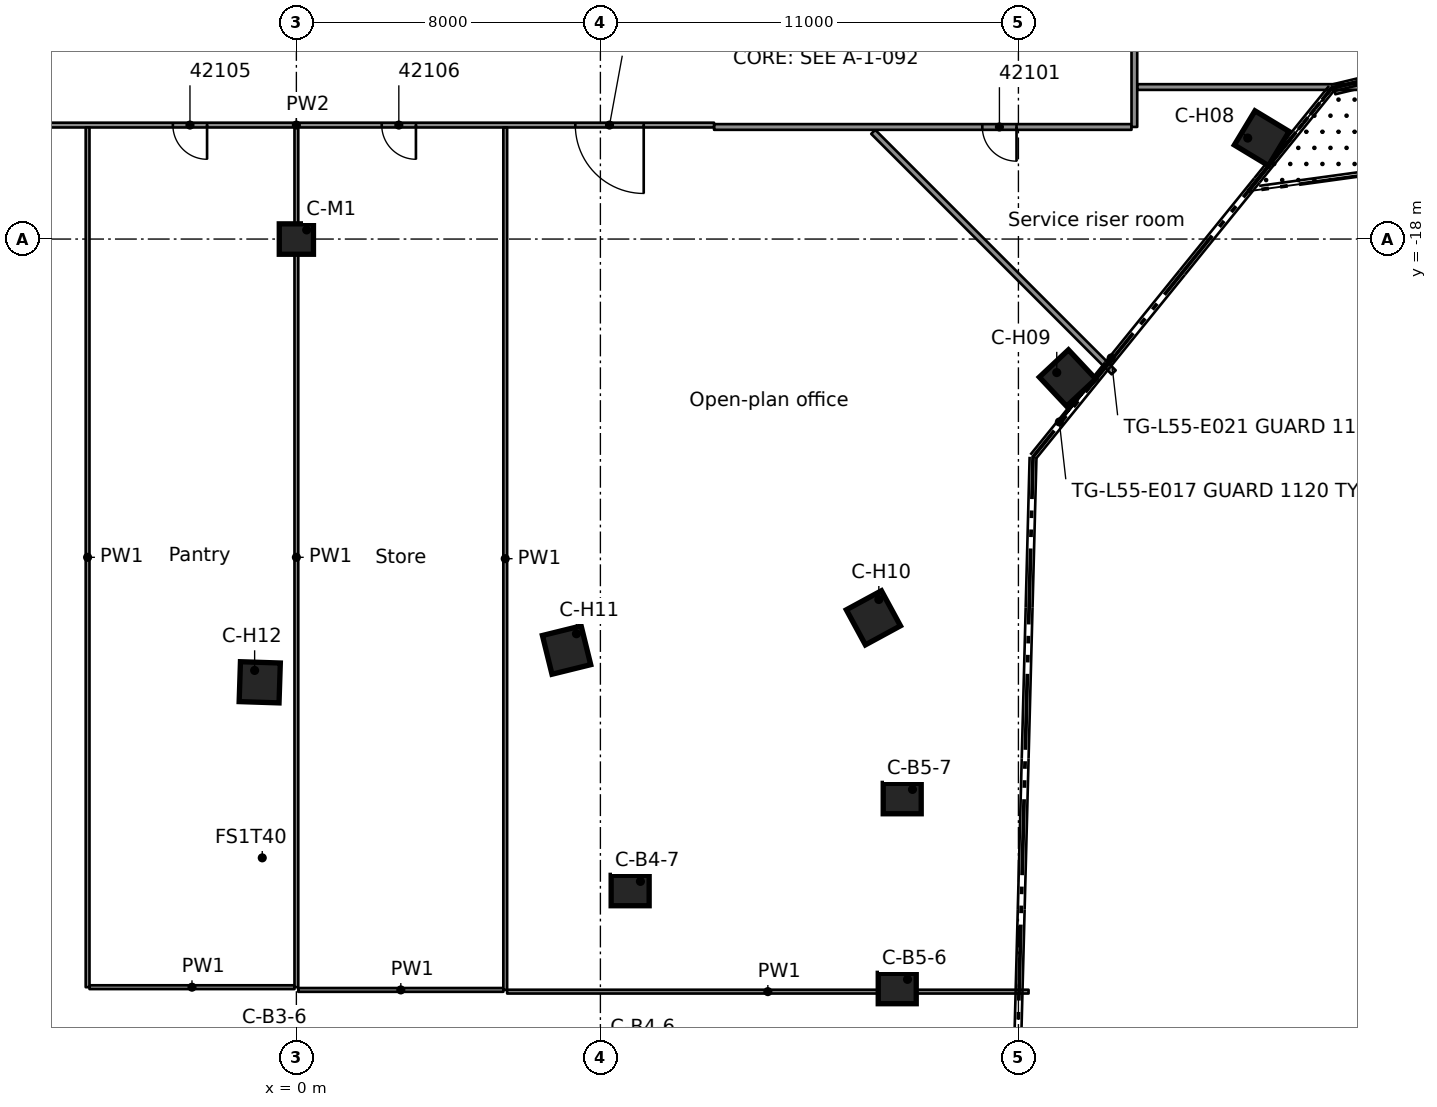
"""IFC4 building model, lengths in metres.
Left out: names, types, materials, properties, quantities, classifications, styles, units other than length and angle.
Written with IfcOpenShell. Run it as: python <this file> out.ifc"""

import sys

from ifc_helpers import new_model, si_unit, direction, frame, frame_2d, origin, origin_2d, place, context, subcontext, project, spatial, rectangle, extrude, element, fill, save


model = new_model("IFC4")
c1 = context("Model", 3, precision=1e-05, world=origin(), true_north=direction((0.0, 1.0)))
c2 = subcontext(c1, "Body", "Model", "MODEL_VIEW")
j1 = project(units=[si_unit("LENGTHUNIT", "METRE"), si_unit("PLANEANGLEUNIT", "RADIAN")], contexts=[c1])
p1 = place(None, origin())
s1 = spatial("IfcSite", under=j1, at=p1, CompositionType="ELEMENT")
p2 = place(p1, origin())
s2 = spatial("IfcBuilding", under=s1, at=p2, CompositionType="ELEMENT")
p3 = place(p2, frame((0.0, 0.0, 210.5)))
s3 = spatial("IfcBuildingStorey", under=s2, at=p3, CompositionType="ELEMENT", Elevation=210.5)
for number, where, z_axis, x_axis in (
    (1, (8.783, -35.142, 0.0), (0.0, 0.0, 1.0), (1.0, 0.0, 0.0)),
    (2, (15.811, -37.72, 0.0), (0.0, 0.0, 1.0), (1.0, 0.0, 0.0)),
    (3, (15.942, -32.722, 0.0), (0.0, 0.0, 1.0), (1.0, 0.0, 0.0)),
):
    element("IfcColumn", number, at=place(p3, frame(where, z_axis=z_axis, x_axis=x_axis)), inside=s3, PredefinedType="COLUMN", context=c2, shape_type="SweptSolid", body=[
        extrude(rectangle(XDim=1.0, YDim=0.8, at=origin_2d()), origin(), (0.0, 0.0, 1.0), 3.5),
    ])
for number, where, z_axis, x_axis in (
    (4, (25.403, -15.347, 0.0), (0.0, 0.0, 1.0), (0.856, -0.517, 0.0)),
    (5, (20.293, -21.657, 0.0), (0.0, 0.0, 1.0), (0.684, -0.73, 0.0)),
    (6, (15.184, -27.966, 0.0), (0.0, 0.0, 1.0), (0.477, -0.879, 0.0)),
    (7, (7.11, -28.815, 0.0), (0.0, 0.0, 1.0), (0.24, -0.971, 0.0)),
    (8, (-0.964, -29.663, 0.0), (0.0, 0.0, 1.0), (-0.032, -0.999, 0.0)),
):
    element("IfcColumn", number, at=place(p3, frame(where, z_axis=z_axis, x_axis=x_axis)), inside=s3, PredefinedType="COLUMN", context=c2, shape_type="SweptSolid", body=[
        extrude(rectangle(XDim=1.05, YDim=1.05, at=origin_2d()), origin(), (0.0, 0.0, 1.0), 3.5),
    ])
p4 = place(p3, frame((0.0, -18.0, 0.0), z_axis=(0.0, 0.0, 1.0), x_axis=(1.0, 0.0, 0.0)))
e9 = element("IfcColumn", 9, at=p4, inside=s3, PredefinedType="COLUMN", context=c2, shape_type="SweptSolid", body=[
    extrude(rectangle(XDim=0.9, YDim=0.8, at=origin_2d()), origin(), (0.0, 0.0, 1.0), 3.5),
])
p5 = place(p3, frame((33.862, -12.573, 0.0), z_axis=(0.0, 0.0, 1.0), x_axis=(-0.97236553207, -0.233463641798, 0.0)))
e10 = element("IfcWall", 10, at=p5, inside=s3, PredefinedType="STANDARD", context=c2, shape_type="SweptSolid", body=[
    extrude(rectangle(XDim=6.72, YDim=0.1, at=frame_2d((3.36, 0.0))), origin(), (0.0, 0.0, 1.0), 3.1),
])
p6 = place(p5, frame((2.46, 0.0, 0.0)))
e11 = element("IfcOpeningElement", 11, at=p6, cuts=e10, PredefinedType="OPENING", context=c2, shape_type="SweptSolid", body=[
    extrude(rectangle(XDim=1.8, YDim=2.4, at=frame_2d((0.9, 1.2))), frame((0.0, 0.06, 0.0), z_axis=(0.0, -1.0, 0.0), x_axis=(1.0, 0.0, 0.0)), (0.0, 0.0, 1.0), 0.12),
])
p7 = place(p5, frame((1.46, 0.0, 0.0)))
e12 = element("IfcOpeningElement", 12, at=p7, cuts=e10, PredefinedType="OPENING", context=c2, shape_type="SweptSolid", body=[
    extrude(rectangle(XDim=0.9, YDim=2.4, at=frame_2d((0.45, 1.2))), frame((0.0, 0.06, 0.0), z_axis=(0.0, -1.0, 0.0), x_axis=(1.0, 0.0, 0.0)), (0.0, 0.0, 1.0), 0.12),
])
p8 = place(p5, frame((4.36, 0.0, 0.0)))
e13 = element("IfcOpeningElement", 13, at=p8, cuts=e10, PredefinedType="OPENING", context=c2, shape_type="SweptSolid", body=[
    extrude(rectangle(XDim=0.9, YDim=2.4, at=frame_2d((0.45, 1.2))), frame((0.0, 0.06, 0.0), z_axis=(0.0, -1.0, 0.0), x_axis=(1.0, 0.0, 0.0)), (0.0, 0.0, 1.0), 0.12),
])
p9 = place(p3, frame((15.179, -15.179, 0.0), z_axis=(0.0, 0.0, 1.0), x_axis=(0.707106781187, -0.707106781187, 0.0)))
e14 = element("IfcWall", 14, at=p9, inside=s3, PredefinedType="PARTITIONING", context=c2, shape_type="SweptSolid", body=[
    extrude(rectangle(XDim=8.949, YDim=0.15, at=frame_2d((4.475, 0.0))), origin(), (0.0, 0.0, 1.0), 3.08),
])
p10 = place(p3, frame((5.546, -37.802, 0.0), z_axis=(0.0, 0.0, 1.0), x_axis=(1.0, 0.0, 0.0)))
e15 = element("IfcWall", 15, at=p10, inside=s3, PredefinedType="PARTITIONING", context=c2, shape_type="SweptSolid", body=[
    extrude(rectangle(XDim=13.721, YDim=0.1, at=frame_2d((6.861, 0.0))), origin(), (0.0, 0.0, 1.0), 3.08),
])
p11 = place(p3, frame((0.05, -37.757, 0.0), z_axis=(0.0, 0.0, 1.0), x_axis=(1.0, 0.0, 0.0)))
e16 = element("IfcWall", 16, at=p11, inside=s3, PredefinedType="PARTITIONING", context=c2, shape_type="SweptSolid", body=[
    extrude(rectangle(XDim=5.396, YDim=0.1, at=frame_2d((2.698, 0.0))), origin(), (0.0, 0.0, 1.0), 3.08),
])
p12 = place(p3, frame((-5.444, -37.685, 0.0), z_axis=(0.0, 0.0, 1.0), x_axis=(1.0, 0.0, 0.0)))
e17 = element("IfcWall", 17, at=p12, inside=s3, PredefinedType="PARTITIONING", context=c2, shape_type="SweptSolid", body=[
    extrude(rectangle(XDim=5.394, YDim=0.1, at=frame_2d((2.697, 0.0))), origin(), (0.0, 0.0, 1.0), 3.08),
])
p13 = place(p3, frame((21.975, -15.051, 0.0), z_axis=(0.0, 0.0, 1.0), x_axis=(-1.0, 0.0, 0.0)))
e18 = element("IfcWall", 18, at=p13, inside=s3, PredefinedType="PARTITIONING", context=c2, shape_type="SweptSolid", body=[
    extrude(rectangle(XDim=10.984, YDim=0.15, at=frame_2d((5.492, 0.0))), origin(), (0.0, 0.0, 1.0), 3.08),
])
p14 = place(p13, frame((3.025, 0.0, 0.0)))
e19 = element("IfcOpeningElement", 19, at=p14, cuts=e18, PredefinedType="OPENING", context=c2, shape_type="SweptSolid", body=[
    extrude(rectangle(XDim=0.9, YDim=2.1, at=frame_2d((0.45, 1.05))), frame((0.0, 0.085, 0.0), z_axis=(0.0, -1.0, 0.0), x_axis=(1.0, 0.0, 0.0)), (0.0, 0.0, 1.0), 0.17),
])
p15 = place(p3, frame((10.99, -15.001, 0.0), z_axis=(0.0, 0.0, 1.0), x_axis=(-1.0, 0.0, 0.0)))
e20 = element("IfcWall", 20, at=p15, inside=s3, PredefinedType="PARTITIONING", context=c2, shape_type="SweptSolid", body=[
    extrude(rectangle(XDim=21.98, YDim=0.125, at=frame_2d((10.99, 0.0))), origin(), (0.0, 0.0, 1.0), 3.08),
])
p16 = place(p15, frame((18.334, 0.0, 0.0)))
e21 = element("IfcOpeningElement", 21, at=p16, cuts=e20, PredefinedType="OPENING", context=c2, shape_type="SweptSolid", body=[
    extrude(rectangle(XDim=1.8, YDim=2.1, at=frame_2d((0.9, 1.05))), frame((0.0, 0.073, 0.0), z_axis=(0.0, -1.0, 0.0), x_axis=(1.0, 0.0, 0.0)), (0.0, 0.0, 1.0), 0.145),
])
p17 = place(p15, frame((13.34, 0.0, 0.0)))
e22 = element("IfcOpeningElement", 22, at=p17, cuts=e20, PredefinedType="OPENING", context=c2, shape_type="SweptSolid", body=[
    extrude(rectangle(XDim=0.9, YDim=2.1, at=frame_2d((0.45, 1.05))), frame((0.0, 0.073, 0.0), z_axis=(0.0, -1.0, 0.0), x_axis=(1.0, 0.0, 0.0)), (0.0, 0.0, 1.0), 0.145),
])
p18 = place(p15, frame((7.844, 0.0, 0.0)))
e23 = element("IfcOpeningElement", 23, at=p18, cuts=e20, PredefinedType="OPENING", context=c2, shape_type="SweptSolid", body=[
    extrude(rectangle(XDim=0.9, YDim=2.1, at=frame_2d((0.45, 1.05))), frame((0.0, 0.073, 0.0), z_axis=(0.0, -1.0, 0.0), x_axis=(1.0, 0.0, 0.0)), (0.0, 0.0, 1.0), 0.145),
])
p19 = place(p15, frame((1.85, 0.0, 0.0)))
e24 = element("IfcOpeningElement", 24, at=p19, cuts=e20, PredefinedType="OPENING", context=c2, shape_type="SweptSolid", body=[
    extrude(rectangle(XDim=1.8, YDim=2.1, at=frame_2d((0.9, 1.05))), frame((0.0, 0.073, 0.0), z_axis=(0.0, -1.0, 0.0), x_axis=(1.0, 0.0, 0.0)), (0.0, 0.0, 1.0), 0.145),
])
p20 = place(p3, frame((22.126, -14.0, 0.0), z_axis=(0.0, 0.0, 1.0), x_axis=(1.0, 0.0, 0.0)))
e25 = element("IfcWall", 25, at=p20, inside=s3, PredefinedType="PARTITIONING", context=c2, shape_type="SweptSolid", body=[
    extrude(rectangle(XDim=6.303, YDim=0.15, at=frame_2d((3.151, 0.0))), origin(), (0.0, 0.0, 1.0), 3.08),
])
p21 = place(p3, frame((22.051, 15.05, 0.0), z_axis=(0.0, 0.0, 1.0), x_axis=(0.0, -1.0, 0.0)))
e26 = element("IfcWall", 26, at=p21, inside=s3, PredefinedType="PARTITIONING", context=c2, shape_type="SweptSolid", body=[
    extrude(rectangle(XDim=30.1, YDim=0.15, at=frame_2d((15.05, 0.0))), origin(), (0.0, 0.0, 1.0), 3.08),
])
p22 = place(p21, frame((24.9, 0.0, 0.0)))
e27 = element("IfcOpeningElement", 27, at=p22, cuts=e26, PredefinedType="OPENING", context=c2, shape_type="SweptSolid", body=[
    extrude(rectangle(XDim=1.1, YDim=2.1, at=frame_2d((0.55, 1.05))), frame((0.0, 0.085, 0.0), z_axis=(0.0, -1.0, 0.0), x_axis=(1.0, 0.0, 0.0)), (0.0, 0.0, 1.0), 0.17),
])
p23 = place(p21, frame((17.65, 0.0, 0.0)))
e28 = element("IfcOpeningElement", 28, at=p23, cuts=e26, PredefinedType="OPENING", context=c2, shape_type="SweptSolid", body=[
    extrude(rectangle(XDim=1.8, YDim=2.1, at=frame_2d((0.9, 1.05))), frame((0.0, 0.085, 0.0), z_axis=(0.0, -1.0, 0.0), x_axis=(1.0, 0.0, 0.0)), (0.0, 0.0, 1.0), 0.17),
])
p24 = place(p21, frame((10.65, 0.0, 0.0)))
e29 = element("IfcOpeningElement", 29, at=p24, cuts=e26, PredefinedType="OPENING", context=c2, shape_type="SweptSolid", body=[
    extrude(rectangle(XDim=1.8, YDim=2.1, at=frame_2d((0.9, 1.05))), frame((0.0, 0.085, 0.0), z_axis=(0.0, -1.0, 0.0), x_axis=(1.0, 0.0, 0.0)), (0.0, 0.0, 1.0), 0.17),
])
p25 = place(p21, frame((3.9, 0.0, 0.0)))
e30 = element("IfcOpeningElement", 30, at=p25, cuts=e26, PredefinedType="OPENING", context=c2, shape_type="SweptSolid", body=[
    extrude(rectangle(XDim=1.1, YDim=2.1, at=frame_2d((0.55, 1.05))), frame((0.0, 0.085, 0.0), z_axis=(0.0, -1.0, 0.0), x_axis=(1.0, 0.0, 0.0)), (0.0, 0.0, 1.0), 0.17),
])
p26 = place(p3, frame((5.496, -37.757, 0.0), z_axis=(0.0, 0.0, 1.0), x_axis=(0.0, 1.0, 0.0)))
e31 = element("IfcWall", 31, at=p26, inside=s3, PredefinedType="PARTITIONING", context=c2, shape_type="SweptSolid", body=[
    extrude(rectangle(XDim=22.694, YDim=0.1, at=frame_2d((11.347, 0.0))), origin(), (0.0, 0.0, 1.0), 3.08),
])
for number, where, z_axis, x_axis in (
    (32, (0.0, -37.685, 0.0), (0.0, 0.0, 1.0), (0.0, 1.0, 0.0)),
    (33, (-5.494, -37.685, 0.0), (0.0, 0.0, 1.0), (0.0, 1.0, 0.0)),
):
    element("IfcWall", number, at=place(p3, frame(where, z_axis=z_axis, x_axis=x_axis)), inside=s3, PredefinedType="PARTITIONING", context=c2, shape_type="SweptSolid", body=[
        extrude(rectangle(XDim=22.622, YDim=0.1, at=frame_2d((11.311, 0.0))), origin(), (0.0, 0.0, 1.0), 3.08),
    ])
p27 = place(p14, origin())
e34 = element("IfcDoor", 34, at=p27, inside=s3, OperationType="SINGLE_SWING_LEFT", PredefinedType="DOOR", context=c2, shape_type="SweptSolid", body=[
    extrude(rectangle(XDim=0.9, YDim=2.1, at=frame_2d((0.45, 1.05))), frame((0.0, 0.025, 0.0), z_axis=(0.0, -1.0, 0.0), x_axis=(1.0, 0.0, 0.0)), (0.0, 0.0, 1.0), 0.05),
])
fill(e19, e34)
p28 = place(p17, origin())
e35 = element("IfcDoor", 35, at=p28, inside=s3, OperationType="SINGLE_SWING_RIGHT", PredefinedType="DOOR", context=c2, shape_type="SweptSolid", body=[
    extrude(rectangle(XDim=0.9, YDim=2.1, at=frame_2d((0.45, 1.05))), frame((0.0, 0.025, 0.0), z_axis=(0.0, -1.0, 0.0), x_axis=(1.0, 0.0, 0.0)), (0.0, 0.0, 1.0), 0.05),
])
fill(e22, e35)
p29 = place(p18, origin())
e36 = element("IfcDoor", 36, at=p29, inside=s3, OperationType="SINGLE_SWING_LEFT", PredefinedType="DOOR", context=c2, shape_type="SweptSolid", body=[
    extrude(rectangle(XDim=0.9, YDim=2.1, at=frame_2d((0.45, 1.05))), frame((0.0, 0.025, 0.0), z_axis=(0.0, -1.0, 0.0), x_axis=(1.0, 0.0, 0.0)), (0.0, 0.0, 1.0), 0.05),
])
fill(e23, e36)
p30 = place(p19, origin())
e37 = element("IfcDoor", 37, at=p30, inside=s3, OperationType="DOUBLE_DOOR_SINGLE_SWING", PredefinedType="DOOR", context=c2, shape_type="SweptSolid", body=[
    extrude(rectangle(XDim=1.8, YDim=2.1, at=frame_2d((0.9, 1.05))), frame((0.0, 0.025, 0.0), z_axis=(0.0, -1.0, 0.0), x_axis=(1.0, 0.0, 0.0)), (0.0, 0.0, 1.0), 0.05),
])
fill(e24, e37)
save(model, sys.argv[1])
